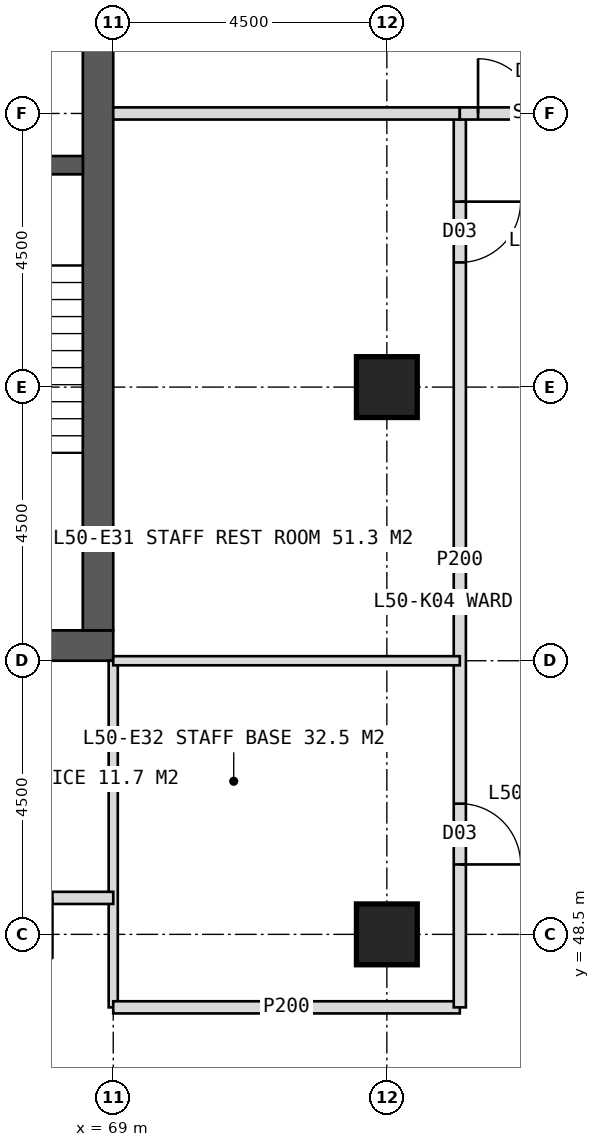
"""IFC4 building model, lengths in metres.
Left out: names, types, materials, properties, quantities, classifications, styles, units other than length and angle.
Written with IfcOpenShell. Run it as: python <this file> out.ifc"""

import sys

from ifc_helpers import new_model, si_unit, direction, frame, frame_2d, origin, origin_2d, place, context, subcontext, project, spatial, rectangle, hollow_rectangle, extrude, element, fill, save


model = new_model("IFC4")
c1 = context("Model", 3, precision=1e-05, world=origin(), true_north=direction((0.0, 1.0)))
c2 = subcontext(c1, "Body", "Model", "MODEL_VIEW")
j1 = project(units=[si_unit("LENGTHUNIT", "METRE"), si_unit("PLANEANGLEUNIT", "RADIAN")], contexts=[c1])
p1 = place(None, origin())
s1 = spatial("IfcSite", under=j1, at=p1, CompositionType="ELEMENT")
p2 = place(p1, origin())
s2 = spatial("IfcBuilding", under=s1, at=p2, CompositionType="ELEMENT")
p3 = place(p2, frame((0.0, 0.0, 209.0)))
s3 = spatial("IfcBuildingStorey", under=s2, at=p3, CompositionType="ELEMENT", Elevation=209.0)
p4 = place(p3, frame((51.0, 53.25, 0.0), z_axis=(0.0, 0.0, 1.0), x_axis=(1.0, 0.0, 0.0)))
e1 = element("IfcWall", 1, at=p4, inside=s3, PredefinedType="SHEAR", context=c2, shape_type="SweptSolid", body=[
    extrude(rectangle(XDim=18.0, YDim=0.5, at=frame_2d((9.0, 0.0))), origin(), (0.0, 0.0, 1.0), 4.0),
])
p5 = place(p4, frame((8.1, 0.0, 0.0)))
e2 = element("IfcOpeningElement", 2, at=p5, cuts=e1, PredefinedType="OPENING", context=c2, shape_type="SweptSolid", body=[
    extrude(rectangle(XDim=1.8, YDim=2.2, at=frame_2d((0.9, 1.1))), frame((0.0, 0.26, 0.0), z_axis=(0.0, -1.0, 0.0), x_axis=(1.0, 0.0, 0.0)), (0.0, 0.0, 1.0), 0.52),
])
p6 = place(p3, frame((68.75, 53.5, 0.0), z_axis=(0.0, 0.0, 1.0), x_axis=(0.0, 1.0, 0.0)))
e3 = element("IfcWall", 3, at=p6, inside=s3, PredefinedType="SHEAR", context=c2, shape_type="SweptSolid", body=[
    extrude(rectangle(XDim=17.0, YDim=0.5, at=frame_2d((8.5, 0.0))), origin(), (0.0, 0.0, 1.0), 4.0),
])
p7 = place(p6, frame((9.6, 0.0, 0.0)))
e4 = element("IfcOpeningElement", 4, at=p7, cuts=e3, PredefinedType="OPENING", context=c2, shape_type="SweptSolid", body=[
    extrude(rectangle(XDim=1.5, YDim=2.2, at=frame_2d((0.75, 1.1))), frame((0.0, 0.26, 0.0), z_axis=(0.0, -1.0, 0.0), x_axis=(1.0, 0.0, 0.0)), (0.0, 0.0, 1.0), 0.52),
])
p8 = place(p3, frame((65.2, 61.15, 0.0), z_axis=(0.0, 0.0, 1.0), x_axis=(1.0, 0.0, 0.0)))
e5 = element("IfcWall", 5, at=p8, inside=s3, PredefinedType="SHEAR", context=c2, shape_type="SweptSolid", body=[
    extrude(rectangle(XDim=3.3, YDim=0.3, at=frame_2d((1.65, 0.0))), origin(), (0.0, 0.0, 1.0), 4.0),
])
p9 = place(p8, frame((1.05, 0.0, 0.0)))
e6 = element("IfcOpeningElement", 6, at=p9, cuts=e5, PredefinedType="OPENING", context=c2, shape_type="SweptSolid", body=[
    extrude(rectangle(XDim=1.2, YDim=2.1, at=frame_2d((0.6, 1.05))), frame((0.0, 0.16, 0.0), z_axis=(0.0, -1.0, 0.0), x_axis=(1.0, 0.0, 0.0)), (0.0, 0.0, 1.0), 0.32),
])
for number, where, z_axis, x_axis in (
    (7, (73.5, 48.5, 0.0), (0.0, 0.0, 1.0), (1.0, 0.0, 0.0)),
    (8, (73.5, 57.5, 0.0), (0.0, 0.0, 1.0), (1.0, 0.0, 0.0)),
):
    element("IfcColumn", number, at=place(p3, frame(where, z_axis=z_axis, x_axis=x_axis)), inside=s3, PredefinedType="COLUMN", context=c2, shape_type="SweptSolid", body=[
        extrude(hollow_rectangle(XDim=1.0, YDim=1.0, WallThickness=0.1, at=origin_2d()), origin(), (0.0, 0.0, 1.0), 4.0),
    ])
p10 = place(p3, frame((69.0, 53.0, 0.0), z_axis=(0.0, 0.0, 1.0), x_axis=(0.0, -1.0, 0.0)))
e9 = element("IfcWall", 9, at=p10, inside=s3, PredefinedType="PARTITIONING", context=c2, shape_type="SweptSolid", body=[
    extrude(rectangle(XDim=5.7, YDim=0.15, at=frame_2d((2.85, 0.0))), origin(), (0.0, 0.0, 1.0), 3.75),
])
p11 = place(p3, frame((74.7, 47.3, 0.0), z_axis=(0.0, 0.0, 1.0), x_axis=(-1.0, 0.0, 0.0)))
e10 = element("IfcWall", 10, at=p11, inside=s3, PredefinedType="PARTITIONING", context=c2, shape_type="SweptSolid", body=[
    extrude(rectangle(XDim=5.7, YDim=0.2, at=frame_2d((2.85, 0.0))), origin(), (0.0, 0.0, 1.0), 3.75),
])
p12 = place(p3, frame((69.0, 49.1, 0.0), z_axis=(0.0, 0.0, 1.0), x_axis=(-1.0, 0.0, 0.0)))
e11 = element("IfcWall", 11, at=p12, inside=s3, PredefinedType="PARTITIONING", context=c2, shape_type="SweptSolid", body=[
    extrude(rectangle(XDim=6.75, YDim=0.2, at=frame_2d((3.375, 0.0))), origin(), (0.0, 0.0, 1.0), 3.75),
])
p13 = place(p12, frame((1.0, 0.0, 0.0)))
e12 = element("IfcOpeningElement", 12, at=p13, cuts=e11, PredefinedType="OPENING", context=c2, shape_type="SweptSolid", body=[
    extrude(rectangle(XDim=1.0, YDim=2.1, at=frame_2d((0.5, 1.05))), frame((0.0, 0.11, 0.0), z_axis=(0.0, -1.0, 0.0), x_axis=(1.0, 0.0, 0.0)), (0.0, 0.0, 1.0), 0.22),
])
p14 = place(p12, frame((5.425, 0.0, 0.0)))
e13 = element("IfcOpeningElement", 13, at=p14, cuts=e11, PredefinedType="OPENING", context=c2, shape_type="SweptSolid", body=[
    extrude(rectangle(XDim=1.0, YDim=2.1, at=frame_2d((0.5, 1.05))), frame((0.0, 0.11, 0.0), z_axis=(0.0, -1.0, 0.0), x_axis=(1.0, 0.0, 0.0)), (0.0, 0.0, 1.0), 0.22),
])
p15 = place(p3, frame((74.7, 62.0, 0.0), z_axis=(0.0, 0.0, 1.0), x_axis=(0.0, -1.0, 0.0)))
e14 = element("IfcWall", 14, at=p15, inside=s3, PredefinedType="PARTITIONING", context=c2, shape_type="SweptSolid", body=[
    extrude(rectangle(XDim=14.7, YDim=0.2, at=frame_2d((7.35, 0.0))), origin(), (0.0, 0.0, 1.0), 3.75),
])
p16 = place(p15, frame((1.45, 0.0, 0.0)))
e15 = element("IfcOpeningElement", 15, at=p16, cuts=e14, PredefinedType="OPENING", context=c2, shape_type="SweptSolid", body=[
    extrude(rectangle(XDim=1.0, YDim=2.1, at=frame_2d((0.5, 1.05))), frame((0.0, 0.11, 0.0), z_axis=(0.0, -1.0, 0.0), x_axis=(1.0, 0.0, 0.0)), (0.0, 0.0, 1.0), 0.22),
])
p17 = place(p15, frame((11.35, 0.0, 0.0)))
e16 = element("IfcOpeningElement", 16, at=p17, cuts=e14, PredefinedType="OPENING", context=c2, shape_type="SweptSolid", body=[
    extrude(rectangle(XDim=1.0, YDim=2.1, at=frame_2d((0.5, 1.05))), frame((0.0, 0.11, 0.0), z_axis=(0.0, -1.0, 0.0), x_axis=(1.0, 0.0, 0.0)), (0.0, 0.0, 1.0), 0.22),
])
p18 = place(p3, frame((69.0, 62.0, 0.0), z_axis=(0.0, 0.0, 1.0), x_axis=(1.0, 0.0, 0.0)))
e17 = element("IfcWall", 17, at=p18, inside=s3, PredefinedType="SOLIDWALL", context=c2, shape_type="SweptSolid", body=[
    extrude(rectangle(XDim=5.7, YDim=0.2, at=frame_2d((2.85, 0.0))), origin(), (0.0, 0.0, 1.0), 2.95),
])
p19 = place(p3, frame((69.0, 53.0, 0.0), z_axis=(0.0, 0.0, 1.0), x_axis=(1.0, 0.0, 0.0)))
e18 = element("IfcWall", 18, at=p19, inside=s3, PredefinedType="PARTITIONING", context=c2, shape_type="SweptSolid", body=[
    extrude(rectangle(XDim=5.7, YDim=0.15, at=frame_2d((2.85, 0.0))), origin(), (0.0, 0.0, 1.0), 3.75),
])
p20 = place(p3, frame((74.7, 62.0, 0.0), z_axis=(0.0, 0.0, 1.0), x_axis=(1.0, 0.0, 0.0)))
e19 = element("IfcWall", 19, at=p20, inside=s3, PredefinedType="SOLIDWALL", context=c2, shape_type="SweptSolid", body=[
    extrude(rectangle(XDim=2.7, YDim=0.2, at=frame_2d((1.35, 0.0))), origin(), (0.0, 0.0, 1.0), 2.95),
])
p21 = place(p20, frame((0.3, 0.0, 0.0)))
e20 = element("IfcOpeningElement", 20, at=p21, cuts=e19, PredefinedType="OPENING", context=c2, shape_type="SweptSolid", body=[
    extrude(rectangle(XDim=1.8, YDim=2.2, at=frame_2d((0.9, 1.1))), frame((0.0, 0.11, 0.0), z_axis=(0.0, -1.0, 0.0), x_axis=(1.0, 0.0, 0.0)), (0.0, 0.0, 1.0), 0.22),
])
p22 = place(p16, origin())
e21 = element("IfcDoor", 21, at=p22, inside=s3, OperationType="SINGLE_SWING_LEFT", PredefinedType="DOOR", context=c2, shape_type="SweptSolid", body=[
    extrude(rectangle(XDim=1.0, YDim=2.1, at=frame_2d((0.5, 1.05))), frame((0.0, 0.025, 0.0), z_axis=(0.0, -1.0, 0.0), x_axis=(1.0, 0.0, 0.0)), (0.0, 0.0, 1.0), 0.05),
])
fill(e15, e21)
p23 = place(p17, origin())
e22 = element("IfcDoor", 22, at=p23, inside=s3, OperationType="SINGLE_SWING_RIGHT", PredefinedType="DOOR", context=c2, shape_type="SweptSolid", body=[
    extrude(rectangle(XDim=1.0, YDim=2.1, at=frame_2d((0.5, 1.05))), frame((0.0, 0.025, 0.0), z_axis=(0.0, -1.0, 0.0), x_axis=(1.0, 0.0, 0.0)), (0.0, 0.0, 1.0), 0.05),
])
fill(e16, e22)
p24 = place(p21, origin())
e23 = element("IfcDoor", 23, at=p24, inside=s3, OperationType="DOUBLE_DOOR_DOUBLE_SWING", PredefinedType="DOOR", context=c2, shape_type="SweptSolid", body=[
    extrude(rectangle(XDim=1.8, YDim=2.2, at=frame_2d((0.9, 1.1))), frame((0.0, 0.025, 0.0), z_axis=(0.0, -1.0, 0.0), x_axis=(1.0, 0.0, 0.0)), (0.0, 0.0, 1.0), 0.05),
])
fill(e20, e23)
save(model, sys.argv[1])
